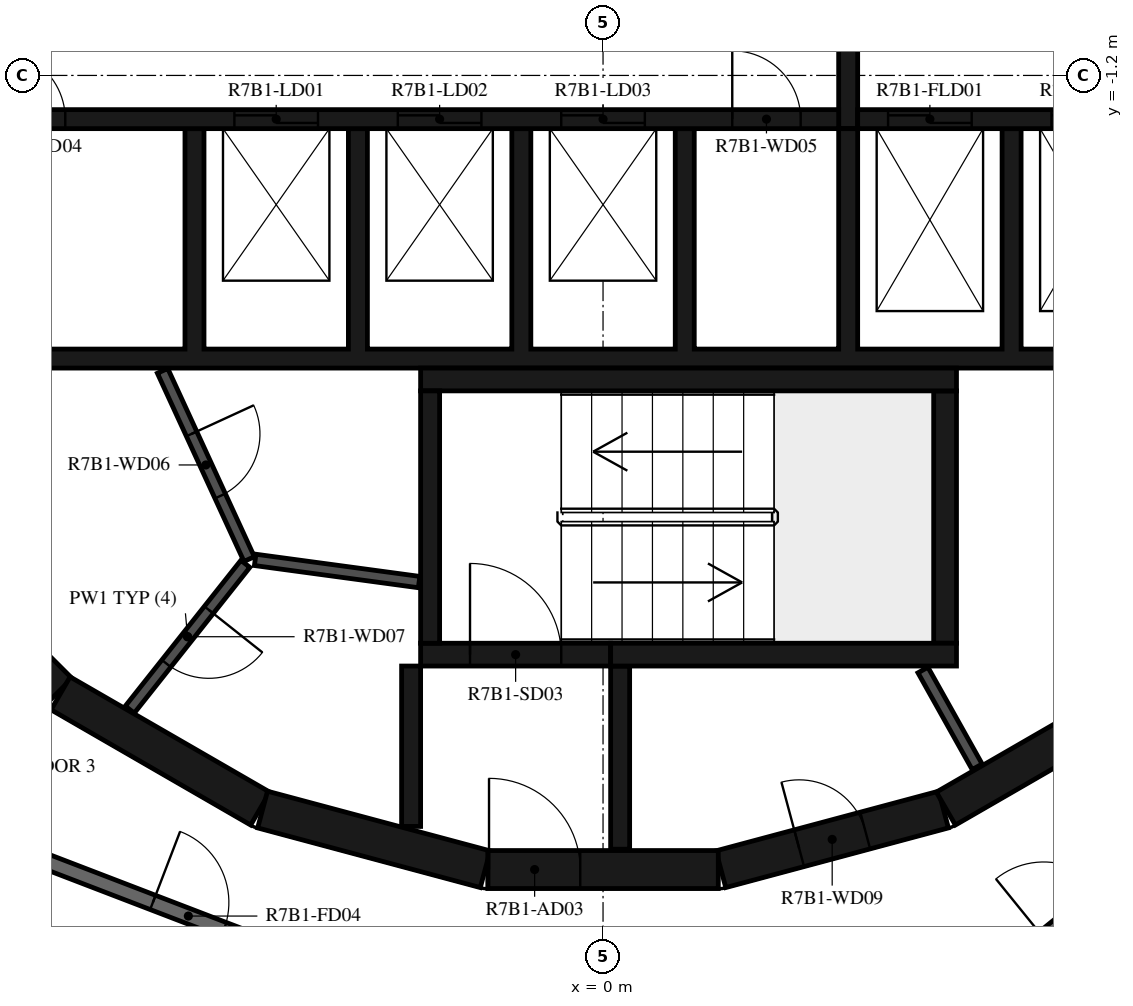
"""IFC4 building model, lengths in metres.
Left out: names, types, materials, properties, quantities, classifications, styles, units other than length and angle.
Written with IfcOpenShell. Run it as: python <this file> out.ifc"""

import sys

from ifc_helpers import new_model, si_unit, direction, frame, frame_2d, origin, place, context, subcontext, project, spatial, polyline, rectangle, outline, extrude, element, fill, save


model = new_model("IFC4")
c1 = context("Model", 3, precision=1e-05, world=origin(), true_north=direction((0.0, 1.0)))
c2 = subcontext(c1, "Body", "Model", "MODEL_VIEW")
j1 = project(units=[si_unit("LENGTHUNIT", "METRE"), si_unit("PLANEANGLEUNIT", "RADIAN")], contexts=[c1])
p1 = place(None, origin())
s1 = spatial("IfcSite", under=j1, at=p1, CompositionType="ELEMENT")
p2 = place(p1, origin())
s2 = spatial("IfcBuilding", under=s1, at=p2, CompositionType="ELEMENT")
p3 = place(p2, frame((0.0, 0.0, 273.9)))
s3 = spatial("IfcBuildingStorey", under=s2, at=p3, CompositionType="ELEMENT", Elevation=273.9)
p4 = place(p3, frame((1.55, -11.643, 0.0), z_axis=(0.0, 0.0, 1.0), x_axis=(0.965948410781, 0.258734743916, 0.0)))
e1 = element("IfcWall", 1, at=p4, inside=s3, PredefinedType="SHEAR", context=c2, shape_type="SweptSolid", body=[
    extrude(rectangle(XDim=3.033, YDim=0.5, at=frame_2d((1.516, 0.0))), origin(), (0.0, 0.0, 1.0), 3.12),
])
p5 = place(p4, frame((1.066, 0.0, 0.0)))
e2 = element("IfcOpeningElement", 2, at=p5, cuts=e1, PredefinedType="OPENING", context=c2, shape_type="SweptSolid", body=[
    extrude(rectangle(XDim=0.9, YDim=2.1, at=frame_2d((0.45, 1.05))), frame((0.0, 0.26, 0.0), z_axis=(0.0, -1.0, 0.0), x_axis=(1.0, 0.0, 0.0)), (0.0, 0.0, 1.0), 0.52),
])
p6 = place(p3, frame((4.51, -10.845, 0.0), z_axis=(0.0, 0.0, 1.0), x_axis=(0.865975092491, 0.500087131594, 0.0)))
e3 = element("IfcWall", 3, at=p6, inside=s3, PredefinedType="SHEAR", context=c2, shape_type="SweptSolid", body=[
    extrude(rectangle(XDim=3.033, YDim=0.5, at=frame_2d((1.516, 0.0))), origin(), (0.0, 0.0, 1.0), 3.12),
])
p7 = place(p3, frame((-9.308, -7.164, 0.0), z_axis=(0.0, 0.0, 1.0), x_axis=(0.707106781187, -0.707106781187, 0.0)))
e4 = element("IfcWall", 4, at=p7, inside=s3, PredefinedType="SHEAR", context=c2, shape_type="SweptSolid", body=[
    extrude(rectangle(XDim=3.032, YDim=0.5, at=frame_2d((1.516, 0.0))), origin(), (0.0, 0.0, 1.0), 3.12),
])
for number, where, z_axis, x_axis in (
    (5, (-7.137, -9.329, 0.0), (0.0, 0.0, 1.0), (0.866, -0.5, 0.0)),
    (6, (-4.479, -10.858, 0.0), (0.0, 0.0, 1.0), (0.966, -0.259, 0.0)),
):
    element("IfcWall", number, at=place(p3, frame(where, z_axis=z_axis, x_axis=x_axis)), inside=s3, PredefinedType="SHEAR", context=c2, shape_type="SweptSolid", body=[
        extrude(rectangle(XDim=3.033, YDim=0.5, at=frame_2d((1.516, 0.0))), origin(), (0.0, 0.0, 1.0), 3.12),
    ])
p8 = place(p3, frame((-1.516, -11.647, 0.0), z_axis=(0.0, 0.0, 1.0), x_axis=(1.0, 0.0, 0.0)))
e7 = element("IfcWall", 7, at=p8, inside=s3, PredefinedType="SHEAR", context=c2, shape_type="SweptSolid", body=[
    extrude(rectangle(XDim=3.033, YDim=0.5, at=frame_2d((1.516, 0.0))), origin(), (0.0, 0.0, 1.0), 3.12),
])
p9 = place(p8, frame((0.016, 0.0, 0.0)))
e8 = element("IfcOpeningElement", 8, at=p9, cuts=e7, PredefinedType="OPENING", context=c2, shape_type="SweptSolid", body=[
    extrude(rectangle(XDim=1.2, YDim=2.1, at=frame_2d((0.6, 1.05))), frame((0.0, 0.26, 0.0), z_axis=(0.0, -1.0, 0.0), x_axis=(1.0, 0.0, 0.0)), (0.0, 0.0, 1.0), 0.52),
])
p10 = place(p3, frame((-2.275, -8.67, 0.0), z_axis=(0.0, 0.0, 1.0), x_axis=(0.0, 1.0, 0.0)))
e9 = element("IfcWall", 9, at=p10, inside=s3, PredefinedType="SHEAR", context=c2, shape_type="SweptSolid", body=[
    extrude(rectangle(XDim=3.32, YDim=0.25, at=frame_2d((1.66, 0.0))), origin(), (0.0, 0.0, 1.0), 3.12),
])
p11 = place(p3, frame((-2.4, -5.2, 0.0), z_axis=(0.0, 0.0, 1.0), x_axis=(1.0, 0.0, 0.0)))
e10 = element("IfcWall", 10, at=p11, inside=s3, PredefinedType="SHEAR", context=c2, shape_type="SweptSolid", body=[
    extrude(rectangle(XDim=7.05, YDim=0.3, at=frame_2d((3.525, 0.0))), origin(), (0.0, 0.0, 1.0), 3.12),
])
p12 = place(p3, frame((4.5, -8.67, 0.0), z_axis=(0.0, 0.0, 1.0), x_axis=(0.0, 1.0, 0.0)))
e11 = element("IfcWall", 11, at=p12, inside=s3, PredefinedType="SHEAR", context=c2, shape_type="SweptSolid", body=[
    extrude(rectangle(XDim=3.32, YDim=0.3, at=frame_2d((1.66, 0.0))), origin(), (0.0, 0.0, 1.0), 3.12),
])
p13 = place(p3, frame((0.1, -8.82, 0.0), z_axis=(0.0, 0.0, 1.0), x_axis=(1.0, 0.0, 0.0)))
e12 = element("IfcWall", 12, at=p13, inside=s3, PredefinedType="SHEAR", context=c2, shape_type="SweptSolid", body=[
    extrude(rectangle(XDim=4.55, YDim=0.3, at=frame_2d((2.275, 0.0))), origin(), (0.0, 0.0, 1.0), 3.12),
])
p14 = place(p3, frame((-2.4, -8.82, 0.0), z_axis=(0.0, 0.0, 1.0), x_axis=(1.0, 0.0, 0.0)))
e13 = element("IfcWall", 13, at=p14, inside=s3, PredefinedType="SHEAR", context=c2, shape_type="SweptSolid", body=[
    extrude(rectangle(XDim=2.5, YDim=0.3, at=frame_2d((1.25, 0.0))), origin(), (0.0, 0.0, 1.0), 3.12),
])
p15 = place(p14, frame((0.65, 0.0, 0.0)))
e14 = element("IfcOpeningElement", 14, at=p15, cuts=e13, PredefinedType="OPENING", context=c2, shape_type="SweptSolid", body=[
    extrude(rectangle(XDim=1.2, YDim=2.1, at=frame_2d((0.6, 1.05))), frame((0.0, 0.16, 0.0), z_axis=(0.0, -1.0, 0.0), x_axis=(1.0, 0.0, 0.0)), (0.0, 0.0, 1.0), 0.32),
])
p16 = place(p3, frame((-2.525, -8.97, 0.0), z_axis=(0.0, 0.0, 1.0), x_axis=(0.0, -1.0, 0.0)))
e15 = element("IfcWall", 15, at=p16, inside=s3, PredefinedType="SHEAR", context=c2, shape_type="SweptSolid", body=[
    extrude(rectangle(XDim=2.11, YDim=0.25, at=frame_2d((1.055, 0.0))), origin(), (0.0, 0.0, 1.0), 3.12),
])
p17 = place(p3, frame((0.225, -8.97, 0.0), z_axis=(0.0, 0.0, 1.0), x_axis=(0.0, -1.0, 0.0)))
e16 = element("IfcWall", 16, at=p17, inside=s3, PredefinedType="SHEAR", context=c2, shape_type="SweptSolid", body=[
    extrude(rectangle(XDim=2.41, YDim=0.25, at=frame_2d((1.205, 0.0))), origin(), (0.0, 0.0, 1.0), 3.12),
])
p18 = place(p3, origin())
e17 = element("IfcWall", 17, at=p18, inside=s3, PredefinedType="SHEAR", context=c2, shape_type="SweptSolid", body=[
    extrude(outline(polyline([(9.8, -5.05), (9.8, -4.8), (9.8, -1.9), (9.55, -1.9), (9.55, -4.8), (7.65, -4.8), (7.65, -1.9), (7.4, -1.9), (7.4, -4.8), (5.5, -4.8), (5.5, -1.9), (5.25, -1.9), (5.25, -4.8), (3.35, -4.8), (3.35, -1.9), (3.1, -1.9), (3.1, -4.8), (1.2, -4.8), (1.2, -1.9), (0.95, -1.9), (0.95, -4.8), (-0.95, -4.8), (-0.95, -1.9), (-1.2, -1.9), (-1.2, -4.8), (-3.1, -4.8), (-3.1, -1.9), (-3.35, -1.9), (-3.35, -4.8), (-5.25, -4.8), (-5.25, -1.9), (-5.5, -1.9), (-5.5, -4.8), (-9.55, -4.8), (-9.55, -1.9), (-9.8, -1.9), (-9.8, -4.8), (-9.8, -5.05), (9.8, -5.05)])), origin(), (0.0, 0.0, 1.0), 3.12),
])
p19 = place(p3, frame((-11.28, -1.775, 0.0), z_axis=(0.0, 0.0, 1.0), x_axis=(1.0, 0.0, 0.0)))
e18 = element("IfcWall", 18, at=p19, inside=s3, PredefinedType="SHEAR", context=c2, shape_type="SweptSolid", body=[
    extrude(rectangle(XDim=14.38, YDim=0.25, at=frame_2d((7.19, 0.0))), origin(), (0.0, 0.0, 1.0), 3.12),
])
p20 = place(p19, frame((6.43, 0.0, 0.0)))
e19 = element("IfcOpeningElement", 19, at=p20, cuts=e18, PredefinedType="OPENING", context=c2, shape_type="SweptSolid", body=[
    extrude(rectangle(XDim=1.1, YDim=2.1, at=frame_2d((0.55, 1.05))), frame((0.0, 0.135, 0.0), z_axis=(0.0, -1.0, 0.0), x_axis=(1.0, 0.0, 0.0)), (0.0, 0.0, 1.0), 0.27),
])
p21 = place(p19, frame((8.58, 0.0, 0.0)))
e20 = element("IfcOpeningElement", 20, at=p21, cuts=e18, PredefinedType="OPENING", context=c2, shape_type="SweptSolid", body=[
    extrude(rectangle(XDim=1.1, YDim=2.1, at=frame_2d((0.55, 1.05))), frame((0.0, 0.135, 0.0), z_axis=(0.0, -1.0, 0.0), x_axis=(1.0, 0.0, 0.0)), (0.0, 0.0, 1.0), 0.27),
])
p22 = place(p19, frame((10.73, 0.0, 0.0)))
e21 = element("IfcOpeningElement", 21, at=p22, cuts=e18, PredefinedType="OPENING", context=c2, shape_type="SweptSolid", body=[
    extrude(rectangle(XDim=1.1, YDim=2.1, at=frame_2d((0.55, 1.05))), frame((0.0, 0.135, 0.0), z_axis=(0.0, -1.0, 0.0), x_axis=(1.0, 0.0, 0.0)), (0.0, 0.0, 1.0), 0.27),
])
p23 = place(p19, frame((3.305, 0.0, 0.0)))
e22 = element("IfcOpeningElement", 22, at=p23, cuts=e18, PredefinedType="OPENING", context=c2, shape_type="SweptSolid", body=[
    extrude(rectangle(XDim=0.9, YDim=2.1, at=frame_2d((0.45, 1.05))), frame((0.0, 0.135, 0.0), z_axis=(0.0, -1.0, 0.0), x_axis=(1.0, 0.0, 0.0)), (0.0, 0.0, 1.0), 0.27),
])
p24 = place(p19, frame((12.98, 0.0, 0.0)))
e23 = element("IfcOpeningElement", 23, at=p24, cuts=e18, PredefinedType="OPENING", context=c2, shape_type="SweptSolid", body=[
    extrude(rectangle(XDim=0.9, YDim=2.1, at=frame_2d((0.45, 1.05))), frame((0.0, 0.135, 0.0), z_axis=(0.0, -1.0, 0.0), x_axis=(1.0, 0.0, 0.0)), (0.0, 0.0, 1.0), 0.27),
])
p25 = place(p3, frame((3.35, -1.775, 0.0), z_axis=(0.0, 0.0, 1.0), x_axis=(1.0, 0.0, 0.0)))
e24 = element("IfcWall", 24, at=p25, inside=s3, PredefinedType="SHEAR", context=c2, shape_type="SweptSolid", body=[
    extrude(rectangle(XDim=7.93, YDim=0.25, at=frame_2d((3.965, 0.0))), origin(), (0.0, 0.0, 1.0), 3.12),
])
p26 = place(p25, frame((0.4, 0.0, 0.0)))
e25 = element("IfcOpeningElement", 25, at=p26, cuts=e24, PredefinedType="OPENING", context=c2, shape_type="SweptSolid", body=[
    extrude(rectangle(XDim=1.1, YDim=2.4, at=frame_2d((0.55, 1.2))), frame((0.0, 0.135, 0.0), z_axis=(0.0, -1.0, 0.0), x_axis=(1.0, 0.0, 0.0)), (0.0, 0.0, 1.0), 0.27),
])
p27 = place(p25, frame((2.55, 0.0, 0.0)))
e26 = element("IfcOpeningElement", 26, at=p27, cuts=e24, PredefinedType="OPENING", context=c2, shape_type="SweptSolid", body=[
    extrude(rectangle(XDim=1.1, YDim=2.4, at=frame_2d((0.55, 1.2))), frame((0.0, 0.135, 0.0), z_axis=(0.0, -1.0, 0.0), x_axis=(1.0, 0.0, 0.0)), (0.0, 0.0, 1.0), 0.27),
])
p28 = place(p25, frame((4.7, 0.0, 0.0)))
e27 = element("IfcOpeningElement", 27, at=p28, cuts=e24, PredefinedType="OPENING", context=c2, shape_type="SweptSolid", body=[
    extrude(rectangle(XDim=1.1, YDim=2.4, at=frame_2d((0.55, 1.2))), frame((0.0, 0.135, 0.0), z_axis=(0.0, -1.0, 0.0), x_axis=(1.0, 0.0, 0.0)), (0.0, 0.0, 1.0), 0.27),
])
p29 = place(p3, frame((3.225, -1.9, 0.0), z_axis=(0.0, 0.0, 1.0), x_axis=(0.0, 1.0, 0.0)))
e28 = element("IfcWall", 28, at=p29, inside=s3, PredefinedType="SHEAR", context=c2, shape_type="SweptSolid", body=[
    extrude(rectangle(XDim=3.8, YDim=0.25, at=frame_2d((1.9, 0.0))), origin(), (0.0, 0.0, 1.0), 3.12),
])
p30 = place(p3, frame((4.922, -10.296, 0.0), z_axis=(0.0, 0.0, 1.0), x_axis=(-0.48860846254, 0.872503163509, 0.0)))
e29 = element("IfcWall", 29, at=p30, inside=s3, PredefinedType="PARTITIONING", context=c2, shape_type="SweptSolid", body=[
    extrude(rectangle(XDim=1.459, YDim=0.15, at=frame_2d((0.73, 0.0))), origin(), (0.0, 0.0, 1.0), 3.12),
])
p31 = place(p3, frame((-5.795, -5.086, 0.0), z_axis=(0.0, 0.0, 1.0), x_axis=(0.417887867606, -0.908498613157, 0.0)))
e30 = element("IfcWall", 30, at=p31, inside=s3, PredefinedType="PARTITIONING", context=c2, shape_type="SweptSolid", body=[
    extrude(rectangle(XDim=2.726, YDim=0.15, at=frame_2d((1.363, 0.0))), origin(), (0.0, 0.0, 1.0), 3.12),
])
p32 = place(p31, frame((0.913, 0.0, 0.0)))
e31 = element("IfcOpeningElement", 31, at=p32, cuts=e30, PredefinedType="OPENING", context=c2, shape_type="SweptSolid", body=[
    extrude(rectangle(XDim=0.9, YDim=2.1, at=frame_2d((0.45, 1.05))), frame((0.0, 0.085, 0.0), z_axis=(0.0, -1.0, 0.0), x_axis=(1.0, 0.0, 0.0)), (0.0, 0.0, 1.0), 0.17),
])
p33 = place(p3, frame((-4.706, -7.625, 0.0), z_axis=(0.0, 0.0, 1.0), x_axis=(-0.621392599334, -0.783499353856, 0.0)))
e32 = element("IfcWall", 32, at=p33, inside=s3, PredefinedType="PARTITIONING", context=c2, shape_type="SweptSolid", body=[
    extrude(rectangle(XDim=2.447, YDim=0.15, at=frame_2d((1.224, 0.0))), origin(), (0.0, 0.0, 1.0), 3.12),
])
p34 = place(p33, frame((0.774, 0.0, 0.0)))
e33 = element("IfcOpeningElement", 33, at=p34, cuts=e32, PredefinedType="OPENING", context=c2, shape_type="SweptSolid", body=[
    extrude(rectangle(XDim=0.9, YDim=2.1, at=frame_2d((0.45, 1.05))), frame((0.0, 0.085, 0.0), z_axis=(0.0, -1.0, 0.0), x_axis=(1.0, 0.0, 0.0)), (0.0, 0.0, 1.0), 0.17),
])
p35 = place(p3, frame((-2.42, -7.865, 0.0), z_axis=(0.0, 0.0, 1.0), x_axis=(-0.990972299108, 0.134066783362, 0.0)))
e34 = element("IfcWall", 34, at=p35, inside=s3, PredefinedType="PARTITIONING", context=c2, shape_type="SweptSolid", body=[
    extrude(rectangle(XDim=2.176, YDim=0.15, at=frame_2d((1.088, 0.0))), origin(), (0.0, 0.0, 1.0), 3.12),
])
p36 = place(p3, frame((-8.154, -11.223, 0.0), z_axis=(0.0, 0.0, 1.0), x_axis=(0.93359073609, -0.358341090983, 0.0)))
e35 = element("IfcWall", 35, at=p36, inside=s3, PredefinedType="STANDARD", context=c2, shape_type="SweptSolid", body=[
    extrude(rectangle(XDim=7.181, YDim=0.2, at=frame_2d((3.59, 0.0))), origin(), (0.0, 0.0, 1.0), 3.12),
])
p37 = place(p36, frame((2.39, 0.0, 0.0)))
e36 = element("IfcOpeningElement", 36, at=p37, cuts=e35, PredefinedType="OPENING", context=c2, shape_type="SweptSolid", body=[
    extrude(rectangle(XDim=1.0, YDim=2.1, at=frame_2d((0.5, 1.05))), frame((0.0, 0.11, 0.0), z_axis=(0.0, -1.0, 0.0), x_axis=(1.0, 0.0, 0.0)), (0.0, 0.0, 1.0), 0.22),
])
p38 = place(p3, frame((5.643, -12.673, 0.0), z_axis=(0.0, 0.0, 1.0), x_axis=(0.777160148113, 0.629302871585, 0.0)))
e37 = element("IfcWall", 37, at=p38, inside=s3, PredefinedType="STANDARD", context=c2, shape_type="SweptSolid", body=[
    extrude(rectangle(XDim=7.181, YDim=0.2, at=frame_2d((3.59, 0.0))), origin(), (0.0, 0.0, 1.0), 3.12),
])
p39 = place(p38, frame((0.2, 0.0, 0.0)))
e38 = element("IfcOpeningElement", 38, at=p39, cuts=e37, PredefinedType="OPENING", context=c2, shape_type="SweptSolid", body=[
    extrude(rectangle(XDim=1.0, YDim=2.1, at=frame_2d((0.5, 1.05))), frame((0.0, 0.11, 0.0), z_axis=(0.0, -1.0, 0.0), x_axis=(1.0, 0.0, 0.0)), (0.0, 0.0, 1.0), 0.22),
])
p40 = place(p15, origin())
e39 = element("IfcDoor", 39, at=p40, inside=s3, OperationType="SINGLE_SWING_LEFT", PredefinedType="DOOR", context=c2, shape_type="SweptSolid", body=[
    extrude(rectangle(XDim=1.2, YDim=2.1, at=frame_2d((0.6, 1.05))), frame((0.0, 0.025, 0.0), z_axis=(0.0, -1.0, 0.0), x_axis=(1.0, 0.0, 0.0)), (0.0, 0.0, 1.0), 0.05),
])
fill(e14, e39)
p41 = place(p9, origin())
e40 = element("IfcDoor", 40, at=p41, inside=s3, OperationType="SINGLE_SWING_RIGHT", PredefinedType="DOOR", context=c2, shape_type="SweptSolid", body=[
    extrude(rectangle(XDim=1.2, YDim=2.1, at=frame_2d((0.6, 1.05))), frame((0.0, 0.025, 0.0), z_axis=(0.0, -1.0, 0.0), x_axis=(1.0, 0.0, 0.0)), (0.0, 0.0, 1.0), 0.05),
])
fill(e8, e40)
p42 = place(p20, origin())
e41 = element("IfcDoor", 41, at=p42, inside=s3, OperationType="DOUBLE_DOOR_SLIDING", PredefinedType="DOOR", context=c2, shape_type="SweptSolid", body=[
    extrude(rectangle(XDim=1.1, YDim=2.1, at=frame_2d((0.55, 1.05))), frame((0.0, 0.025, 0.0), z_axis=(0.0, -1.0, 0.0), x_axis=(1.0, 0.0, 0.0)), (0.0, 0.0, 1.0), 0.05),
])
fill(e19, e41)
p43 = place(p21, origin())
e42 = element("IfcDoor", 42, at=p43, inside=s3, OperationType="DOUBLE_DOOR_SLIDING", PredefinedType="DOOR", context=c2, shape_type="SweptSolid", body=[
    extrude(rectangle(XDim=1.1, YDim=2.1, at=frame_2d((0.55, 1.05))), frame((0.0, 0.025, 0.0), z_axis=(0.0, -1.0, 0.0), x_axis=(1.0, 0.0, 0.0)), (0.0, 0.0, 1.0), 0.05),
])
fill(e20, e42)
p44 = place(p22, origin())
e43 = element("IfcDoor", 43, at=p44, inside=s3, OperationType="DOUBLE_DOOR_SLIDING", PredefinedType="DOOR", context=c2, shape_type="SweptSolid", body=[
    extrude(rectangle(XDim=1.1, YDim=2.1, at=frame_2d((0.55, 1.05))), frame((0.0, 0.025, 0.0), z_axis=(0.0, -1.0, 0.0), x_axis=(1.0, 0.0, 0.0)), (0.0, 0.0, 1.0), 0.05),
])
fill(e21, e43)
p45 = place(p26, origin())
e44 = element("IfcDoor", 44, at=p45, inside=s3, OperationType="DOUBLE_DOOR_SLIDING", PredefinedType="DOOR", context=c2, shape_type="SweptSolid", body=[
    extrude(rectangle(XDim=1.1, YDim=2.4, at=frame_2d((0.55, 1.2))), frame((0.0, 0.025, 0.0), z_axis=(0.0, -1.0, 0.0), x_axis=(1.0, 0.0, 0.0)), (0.0, 0.0, 1.0), 0.05),
])
fill(e25, e44)
p46 = place(p27, origin())
e45 = element("IfcDoor", 45, at=p46, inside=s3, OperationType="DOUBLE_DOOR_SLIDING", PredefinedType="DOOR", context=c2, shape_type="SweptSolid", body=[
    extrude(rectangle(XDim=1.1, YDim=2.4, at=frame_2d((0.55, 1.2))), frame((0.0, 0.025, 0.0), z_axis=(0.0, -1.0, 0.0), x_axis=(1.0, 0.0, 0.0)), (0.0, 0.0, 1.0), 0.05),
])
fill(e26, e45)
p47 = place(p23, origin())
e46 = element("IfcDoor", 46, at=p47, inside=s3, OperationType="SINGLE_SWING_RIGHT", PredefinedType="DOOR", context=c2, shape_type="SweptSolid", body=[
    extrude(rectangle(XDim=0.9, YDim=2.1, at=frame_2d((0.45, 1.05))), frame((0.0, 0.025, 0.0), z_axis=(0.0, -1.0, 0.0), x_axis=(1.0, 0.0, 0.0)), (0.0, 0.0, 1.0), 0.05),
])
fill(e22, e46)
p48 = place(p24, origin())
e47 = element("IfcDoor", 47, at=p48, inside=s3, OperationType="SINGLE_SWING_LEFT", PredefinedType="DOOR", context=c2, shape_type="SweptSolid", body=[
    extrude(rectangle(XDim=0.9, YDim=2.1, at=frame_2d((0.45, 1.05))), frame((0.0, 0.025, 0.0), z_axis=(0.0, -1.0, 0.0), x_axis=(1.0, 0.0, 0.0)), (0.0, 0.0, 1.0), 0.05),
])
fill(e23, e47)
p49 = place(p32, origin())
e48 = element("IfcDoor", 48, at=p49, inside=s3, OperationType="SINGLE_SWING_RIGHT", PredefinedType="DOOR", context=c2, shape_type="SweptSolid", body=[
    extrude(rectangle(XDim=0.9, YDim=2.1, at=frame_2d((0.45, 1.05))), frame((0.0, 0.025, 0.0), z_axis=(0.0, -1.0, 0.0), x_axis=(1.0, 0.0, 0.0)), (0.0, 0.0, 1.0), 0.05),
])
fill(e31, e48)
p50 = place(p34, origin())
e49 = element("IfcDoor", 49, at=p50, inside=s3, OperationType="SINGLE_SWING_LEFT", PredefinedType="DOOR", context=c2, shape_type="SweptSolid", body=[
    extrude(rectangle(XDim=0.9, YDim=2.1, at=frame_2d((0.45, 1.05))), frame((0.0, 0.025, 0.0), z_axis=(0.0, -1.0, 0.0), x_axis=(1.0, 0.0, 0.0)), (0.0, 0.0, 1.0), 0.05),
])
fill(e33, e49)
p51 = place(p5, origin())
e50 = element("IfcDoor", 50, at=p51, inside=s3, OperationType="SINGLE_SWING_LEFT", PredefinedType="DOOR", context=c2, shape_type="SweptSolid", body=[
    extrude(rectangle(XDim=0.9, YDim=2.1, at=frame_2d((0.45, 1.05))), frame((0.0, 0.025, 0.0), z_axis=(0.0, -1.0, 0.0), x_axis=(1.0, 0.0, 0.0)), (0.0, 0.0, 1.0), 0.05),
])
fill(e2, e50)
p52 = place(p37, origin())
e51 = element("IfcDoor", 51, at=p52, inside=s3, OperationType="SINGLE_SWING_RIGHT", PredefinedType="DOOR", context=c2, shape_type="SweptSolid", body=[
    extrude(rectangle(XDim=1.0, YDim=2.1, at=frame_2d((0.5, 1.05))), frame((0.0, 0.025, 0.0), z_axis=(0.0, -1.0, 0.0), x_axis=(1.0, 0.0, 0.0)), (0.0, 0.0, 1.0), 0.05),
])
fill(e36, e51)
p53 = place(p39, origin())
e52 = element("IfcDoor", 52, at=p53, inside=s3, OperationType="SINGLE_SWING_LEFT", PredefinedType="DOOR", context=c2, shape_type="SweptSolid", body=[
    extrude(rectangle(XDim=1.0, YDim=2.1, at=frame_2d((0.5, 1.05))), frame((0.0, 0.025, 0.0), z_axis=(0.0, -1.0, 0.0), x_axis=(1.0, 0.0, 0.0)), (0.0, 0.0, 1.0), 0.05),
])
fill(e38, e52)
save(model, sys.argv[1])
